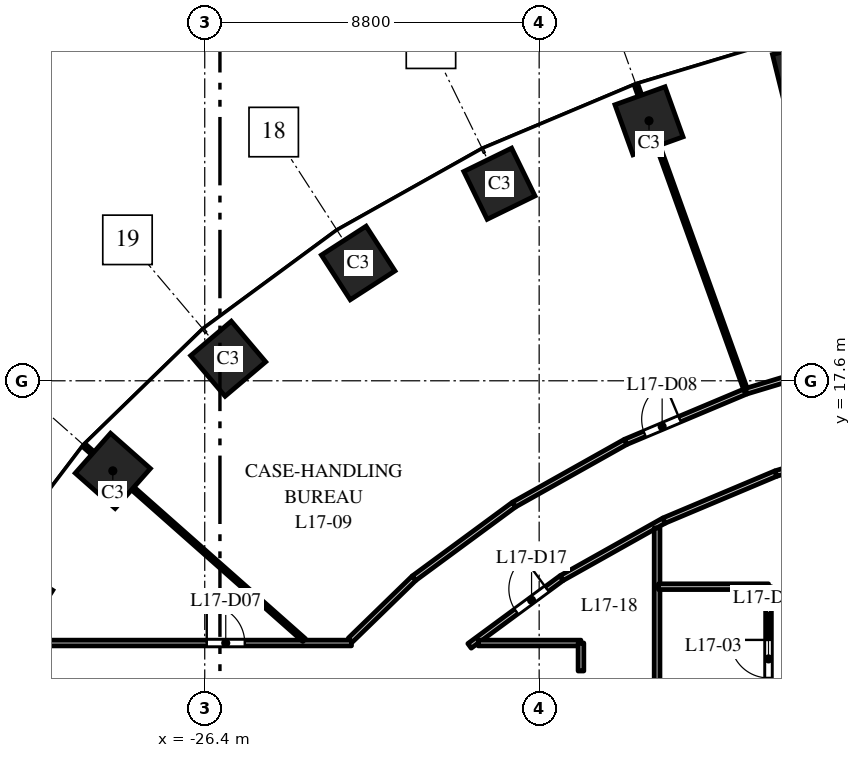
"""IFC4 building model, lengths in metres.
Left out: names, types, materials, properties, quantities, classifications, styles, units other than length and angle.
Written with IfcOpenShell. Run it as: python <this file> out.ifc"""

import sys

from ifc_helpers import new_model, si_unit, direction, frame, frame_2d, origin, origin_2d, place, context, subcontext, project, spatial, rectangle, extrude, element, fill, save


model = new_model("IFC4")
c1 = context("Model", 3, precision=1e-05, world=origin(), true_north=direction((0.0, 1.0)))
c2 = subcontext(c1, "Body", "Model", "MODEL_VIEW")
j1 = project(units=[si_unit("LENGTHUNIT", "METRE"), si_unit("PLANEANGLEUNIT", "RADIAN")], contexts=[c1])
p1 = place(None, origin())
s1 = spatial("IfcSite", under=j1, at=p1, CompositionType="ELEMENT")
p2 = place(p1, origin())
s2 = spatial("IfcBuilding", under=s1, at=p2, CompositionType="ELEMENT")
p3 = place(p2, frame((0.0, 0.0, 78.5)))
s3 = spatial("IfcBuildingStorey", under=s2, at=p3, CompositionType="ELEMENT", Elevation=78.5)
for number, where, z_axis, x_axis in (
    (1, (-10.613, 25.674, 0.0), (0.0, 0.0, 1.0), (-0.971, -0.24, 0.0)),
    (2, (-14.709, 24.441, 0.0), (0.0, 0.0, 1.0), (-0.941, -0.338, 0.0)),
    (3, (-18.646, 22.785, 0.0), (0.0, 0.0, 1.0), (-0.898, -0.439, 0.0)),
    (4, (-22.362, 20.7, 0.0), (0.0, 0.0, 1.0), (-0.84, -0.542, 0.0)),
    (5, (-25.783, 18.18, 0.0), (0.0, 0.0, 1.0), (-0.763, -0.646, 0.0)),
    (6, (-28.819, 15.23, 0.0), (0.0, 0.0, 1.0), (-0.663, -0.749, 0.0)),
    (7, (-31.365, 11.871, 0.0), (0.0, 0.0, 1.0), (-0.535, -0.845, 0.0)),
):
    element("IfcColumn", number, at=place(p3, frame(where, z_axis=z_axis, x_axis=x_axis)), inside=s3, PredefinedType="COLUMN", context=c2, shape_type="SweptSolid", body=[
        extrude(rectangle(XDim=1.4, YDim=1.4, at=origin_2d()), origin(), (0.0, 0.0, 1.0), 4.0),
    ])
p4 = place(p3, frame((-31.5, 10.7, 0.0), z_axis=(0.0, 0.0, 1.0), x_axis=(1.0, 0.0, 0.0)))
e8 = element("IfcWall", 8, at=p4, inside=s3, PredefinedType="PARTITIONING", context=c2, shape_type="SweptSolid", body=[
    extrude(rectangle(XDim=8.961, YDim=0.15, at=frame_2d((4.48, 0.0))), origin(), (0.0, 0.0, 1.0), 3.1),
])
p5 = place(p4, frame((5.153, 0.0, 0.0)))
e9 = element("IfcOpeningElement", 9, at=p5, cuts=e8, PredefinedType="OPENING", context=c2, shape_type="SweptSolid", body=[
    extrude(rectangle(XDim=1.0, YDim=2.1, at=frame_2d((0.5, 1.05))), frame((0.0, 0.085, 0.0), z_axis=(0.0, -1.0, 0.0), x_axis=(1.0, 0.0, 0.0)), (0.0, 0.0, 1.0), 0.17),
])
p6 = place(p3, frame((-29.569, 15.895, 0.0), z_axis=(0.0, 0.0, 1.0), x_axis=(0.748985701008, -0.662586160198, 0.0)))
e10 = element("IfcWall", 10, at=p6, inside=s3, PredefinedType="PARTITIONING", context=c2, shape_type="SweptSolid", body=[
    extrude(rectangle(XDim=7.723, YDim=0.1, at=frame_2d((3.861, 0.0))), origin(), (0.0, 0.0, 1.0), 2.85),
])
p7 = place(p3, frame((-22.57, 10.775, 0.0), z_axis=(0.0, 0.0, 1.0), x_axis=(0.717045582263, 0.697026278527, 0.0)))
e11 = element("IfcWall", 11, at=p7, inside=s3, PredefinedType="PARTITIONING", context=c2, shape_type="SweptSolid", body=[
    extrude(rectangle(XDim=2.342, YDim=0.15, at=frame_2d((1.171, 0.0))), origin(), (0.0, 0.0, 1.0), 3.7),
])
p8 = place(p3, frame((-20.891, 12.407, 0.0), z_axis=(0.0, 0.0, 1.0), x_axis=(0.805303685339, 0.592862525701, 0.0)))
e12 = element("IfcWall", 12, at=p8, inside=s3, PredefinedType="PARTITIONING", context=c2, shape_type="SweptSolid", body=[
    extrude(rectangle(XDim=3.267, YDim=0.15, at=frame_2d((1.634, 0.0))), origin(), (0.0, 0.0, 1.0), 2.75),
])
p9 = place(p3, frame((-19.432, 10.625, 0.0), z_axis=(0.0, 0.0, 1.0), x_axis=(0.805306738654, 0.592858378265, 0.0)))
e13 = element("IfcWall", 13, at=p9, inside=s3, PredefinedType="PARTITIONING", context=c2, shape_type="SweptSolid", body=[
    extrude(rectangle(XDim=3.007, YDim=0.15, at=frame_2d((1.504, 0.0))), origin(), (0.0, 0.0, 1.0), 2.75),
])
p10 = place(p9, frame((1.527, 0.0, 0.0)))
e14 = element("IfcOpeningElement", 14, at=p10, cuts=e13, PredefinedType="OPENING", context=c2, shape_type="SweptSolid", body=[
    extrude(rectangle(XDim=1.0, YDim=2.1, at=frame_2d((0.5, 1.05))), frame((0.0, 0.085, 0.0), z_axis=(0.0, -1.0, 0.0), x_axis=(1.0, 0.0, 0.0)), (0.0, 0.0, 1.0), 0.17),
])
p11 = place(p3, frame((-19.203, 10.7, 0.0), z_axis=(0.0, 0.0, 1.0), x_axis=(1.0, 0.0, 0.0)))
e15 = element("IfcWall", 15, at=p11, inside=s3, PredefinedType="PARTITIONING", context=c2, shape_type="SweptSolid", body=[
    extrude(rectangle(XDim=2.703, YDim=0.15, at=frame_2d((1.352, 0.0))), origin(), (0.0, 0.0, 1.0), 3.7),
])
p12 = place(p3, frame((-18.26, 14.344, 0.0), z_axis=(0.0, 0.0, 1.0), x_axis=(0.871958798398, 0.489579262118, 0.0)))
e16 = element("IfcWall", 16, at=p12, inside=s3, PredefinedType="PARTITIONING", context=c2, shape_type="SweptSolid", body=[
    extrude(rectangle(XDim=3.366, YDim=0.15, at=frame_2d((1.683, 0.0))), origin(), (0.0, 0.0, 1.0), 3.7),
])
p13 = place(p3, frame((-17.01, 12.408, 0.0), z_axis=(0.0, 0.0, 1.0), x_axis=(0.871977874087, 0.489545286059, 0.0)))
e17 = element("IfcWall", 17, at=p13, inside=s3, PredefinedType="PARTITIONING", context=c2, shape_type="SweptSolid", body=[
    extrude(rectangle(XDim=3.093, YDim=0.15, at=frame_2d((1.546, 0.0))), origin(), (0.0, 0.0, 1.0), 3.7),
])
p14 = place(p3, frame((-16.5, 9.964, 0.0), z_axis=(0.0, 0.0, 1.0), x_axis=(0.0, 1.0, 0.0)))
e18 = element("IfcWall", 18, at=p14, inside=s3, PredefinedType="PARTITIONING", context=c2, shape_type="SweptSolid", body=[
    extrude(rectangle(XDim=0.736, YDim=0.15, at=frame_2d((0.368, 0.0))), origin(), (0.0, 0.0, 1.0), 3.7),
])
p15 = place(p3, frame((-15.325, 15.992, 0.0), z_axis=(0.0, 0.0, 1.0), x_axis=(0.921891448612, 0.387448263612, 0.0)))
e19 = element("IfcWall", 19, at=p15, inside=s3, PredefinedType="PARTITIONING", context=c2, shape_type="SweptSolid", body=[
    extrude(rectangle(XDim=3.443, YDim=0.15, at=frame_2d((1.722, 0.0))), origin(), (0.0, 0.0, 1.0), 2.85),
])
p16 = place(p15, frame((0.543, 0.0, 0.0)))
e20 = element("IfcOpeningElement", 20, at=p16, cuts=e19, PredefinedType="OPENING", context=c2, shape_type="SweptSolid", body=[
    extrude(rectangle(XDim=1.0, YDim=2.1, at=frame_2d((0.5, 1.05))), frame((0.0, 0.085, 0.0), z_axis=(0.0, -1.0, 0.0), x_axis=(1.0, 0.0, 0.0)), (0.0, 0.0, 1.0), 0.17),
])
p17 = place(p3, frame((-15.048, 25.383, 0.0), z_axis=(0.0, 0.0, 1.0), x_axis=(0.338300183564, -0.941038248851, 0.0)))
e21 = element("IfcWall", 21, at=p17, inside=s3, PredefinedType="PARTITIONING", context=c2, shape_type="SweptSolid", body=[
    extrude(rectangle(XDim=8.558, YDim=0.1, at=frame_2d((4.279, 0.0))), origin(), (0.0, 0.0, 1.0), 2.85),
])
p18 = place(p3, frame((-14.497, 9.0, 0.0), z_axis=(0.0, 0.0, 1.0), x_axis=(0.0, 1.0, 0.0)))
e22 = element("IfcWall", 22, at=p18, inside=s3, PredefinedType="PARTITIONING", context=c2, shape_type="SweptSolid", body=[
    extrude(rectangle(XDim=4.729, YDim=0.15, at=frame_2d((2.365, 0.0))), origin(), (0.0, 0.0, 1.0), 2.75),
])
p19 = place(p3, frame((-14.461, 12.182, 0.0), z_axis=(0.0, 0.0, 1.0), x_axis=(1.0, 0.0, 0.0)))
e23 = element("IfcWall", 23, at=p19, inside=s3, PredefinedType="PARTITIONING", context=c2, shape_type="SweptSolid", body=[
    extrude(rectangle(XDim=2.896, YDim=0.15, at=frame_2d((1.448, 0.0))), origin(), (0.0, 0.0, 1.0), 3.7),
])
p20 = place(p3, frame((-14.313, 13.922, 0.0), z_axis=(0.0, 0.0, 1.0), x_axis=(0.921799502591, 0.387666966638, 0.0)))
e24 = element("IfcWall", 24, at=p20, inside=s3, PredefinedType="PARTITIONING", context=c2, shape_type="SweptSolid", body=[
    extrude(rectangle(XDim=3.19, YDim=0.15, at=frame_2d((1.595, 0.0))), origin(), (0.0, 0.0, 1.0), 2.85),
])
p21 = place(p3, frame((-12.151, 17.326, 0.0), z_axis=(0.0, 0.0, 1.0), x_axis=(0.957528149021, 0.288339806186, 0.0)))
e25 = element("IfcWall", 25, at=p21, inside=s3, PredefinedType="PARTITIONING", context=c2, shape_type="SweptSolid", body=[
    extrude(rectangle(XDim=3.5, YDim=0.15, at=frame_2d((1.75, 0.0))), origin(), (0.0, 0.0, 1.0), 3.7),
])
p22 = place(p3, frame((-11.565, 3.342, 0.0), z_axis=(0.0, 0.0, 1.0), x_axis=(0.0, 1.0, 0.0)))
e26 = element("IfcWall", 26, at=p22, inside=s3, PredefinedType="PARTITIONING", context=c2, shape_type="SweptSolid", body=[
    extrude(rectangle(XDim=8.84, YDim=0.15, at=frame_2d((4.42, 0.0))), origin(), (0.0, 0.0, 1.0), 2.75),
])
p23 = place(p22, frame((6.44, 0.0, 0.0)))
e27 = element("IfcOpeningElement", 27, at=p23, cuts=e26, PredefinedType="OPENING", context=c2, shape_type="SweptSolid", body=[
    extrude(rectangle(XDim=1.0, YDim=2.1, at=frame_2d((0.5, 1.05))), frame((0.0, 0.085, 0.0), z_axis=(0.0, -1.0, 0.0), x_axis=(1.0, 0.0, 0.0)), (0.0, 0.0, 1.0), 0.17),
])
p24 = place(p22, frame((4.07, 0.0, 0.0)))
e28 = element("IfcOpeningElement", 28, at=p24, cuts=e26, PredefinedType="OPENING", context=c2, shape_type="SweptSolid", body=[
    extrude(rectangle(XDim=1.0, YDim=2.1, at=frame_2d((0.5, 1.05))), frame((0.0, 0.085, 0.0), z_axis=(0.0, -1.0, 0.0), x_axis=(1.0, 0.0, 0.0)), (0.0, 0.0, 1.0), 0.17),
])
p25 = place(p22, frame((0.658, 0.0, 0.0)))
e29 = element("IfcOpeningElement", 29, at=p25, cuts=e26, PredefinedType="OPENING", context=c2, shape_type="SweptSolid", body=[
    extrude(rectangle(XDim=1.0, YDim=2.1, at=frame_2d((0.5, 1.05))), frame((0.0, 0.085, 0.0), z_axis=(0.0, -1.0, 0.0), x_axis=(1.0, 0.0, 0.0)), (0.0, 0.0, 1.0), 0.17),
])
p26 = place(p3, frame((-11.372, 15.159, 0.0), z_axis=(0.0, 0.0, 1.0), x_axis=(0.95757464185, 0.28818536619, 0.0)))
e30 = element("IfcWall", 30, at=p26, inside=s3, PredefinedType="PARTITIONING", context=c2, shape_type="SweptSolid", body=[
    extrude(rectangle(XDim=3.262, YDim=0.15, at=frame_2d((1.631, 0.0))), origin(), (0.0, 0.0, 1.0), 3.7),
])
p27 = place(p23, origin())
e31 = element("IfcDoor", 31, at=p27, inside=s3, OperationType="SINGLE_SWING_RIGHT", PredefinedType="DOOR", context=c2, shape_type="SweptSolid", body=[
    extrude(rectangle(XDim=1.0, YDim=2.1, at=frame_2d((0.5, 1.05))), frame((0.0, 0.025, 0.0), z_axis=(0.0, -1.0, 0.0), x_axis=(1.0, 0.0, 0.0)), (0.0, 0.0, 1.0), 0.05),
])
fill(e27, e31)
p28 = place(p5, origin())
e32 = element("IfcDoor", 32, at=p28, inside=s3, OperationType="SINGLE_SWING_LEFT", PredefinedType="DOOR", context=c2, shape_type="SweptSolid", body=[
    extrude(rectangle(XDim=1.0, YDim=2.1, at=frame_2d((0.5, 1.05))), frame((0.0, 0.025, 0.0), z_axis=(0.0, -1.0, 0.0), x_axis=(1.0, 0.0, 0.0)), (0.0, 0.0, 1.0), 0.05),
])
fill(e9, e32)
p29 = place(p16, origin())
e33 = element("IfcDoor", 33, at=p29, inside=s3, OperationType="SINGLE_SWING_RIGHT", PredefinedType="DOOR", context=c2, shape_type="SweptSolid", body=[
    extrude(rectangle(XDim=1.0, YDim=2.1, at=frame_2d((0.5, 1.05))), frame((0.0, 0.025, 0.0), z_axis=(0.0, -1.0, 0.0), x_axis=(1.0, 0.0, 0.0)), (0.0, 0.0, 1.0), 0.05),
])
fill(e20, e33)
p30 = place(p10, origin())
e34 = element("IfcDoor", 34, at=p30, inside=s3, OperationType="SINGLE_SWING_RIGHT", PredefinedType="DOOR", context=c2, shape_type="SweptSolid", body=[
    extrude(rectangle(XDim=1.0, YDim=2.1, at=frame_2d((0.5, 1.05))), frame((0.0, 0.025, 0.0), z_axis=(0.0, -1.0, 0.0), x_axis=(1.0, 0.0, 0.0)), (0.0, 0.0, 1.0), 0.05),
])
fill(e14, e34)
save(model, sys.argv[1])
